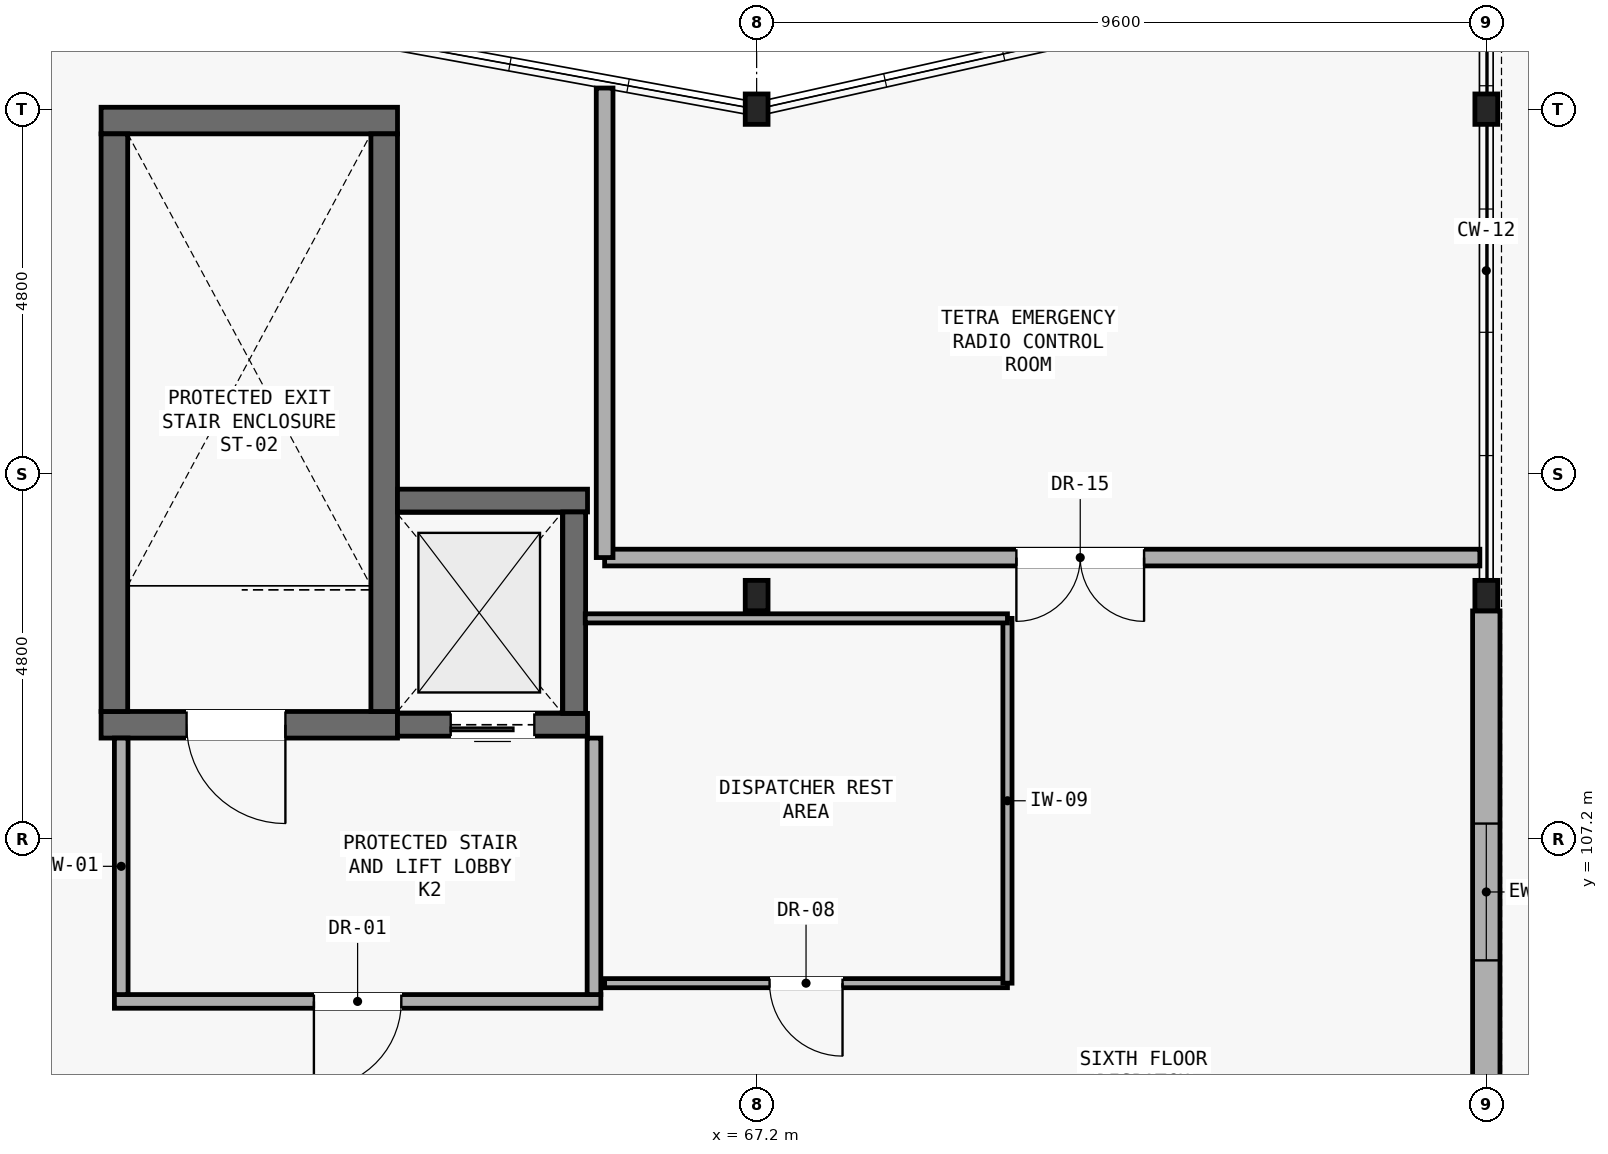
"""IFC4 building model, lengths in metres.
Left out: names, types, materials, properties, quantities, classifications, styles, units other than length and angle.
Written with IfcOpenShell. Run it as: python <this file> out.ifc"""

import sys

from ifc_helpers import new_model, si_unit, direction, frame, frame_2d, origin, origin_2d, place, context, subcontext, project, spatial, rectangle, i_section, extrude, element, fill, save


model = new_model("IFC4")
c1 = context("Model", 3, precision=1e-05, world=origin(), true_north=direction((0.0, 1.0)))
c2 = subcontext(c1, "Body", "Model", "MODEL_VIEW")
j1 = project(units=[si_unit("LENGTHUNIT", "METRE"), si_unit("PLANEANGLEUNIT", "RADIAN")], contexts=[c1])
p1 = place(None, origin())
s1 = spatial("IfcSite", under=j1, at=p1, CompositionType="ELEMENT")
p2 = place(p1, origin())
s2 = spatial("IfcBuilding", under=s1, at=p2, CompositionType="ELEMENT")
p3 = place(p2, frame((0.0, 0.0, 26.25)))
s3 = spatial("IfcBuildingStorey", under=s2, at=p3, CompositionType="ELEMENT", Elevation=26.25)
for number, where, z_axis, x_axis in (
    (1, (67.2, 110.4, 0.0), (0.0, 0.0, 1.0), (1.0, 0.0, 0.0)),
    (2, (67.2, 116.8, 0.0), (0.0, 0.0, 1.0), (1.0, 0.0, 0.0)),
    (3, (76.8, 110.4, 0.0), (0.0, 0.0, 1.0), (1.0, 0.0, 0.0)),
    (4, (76.8, 116.8, 0.0), (0.0, 0.0, 1.0), (1.0, 0.0, 0.0)),
):
    element("IfcColumn", number, at=place(p3, frame(where, z_axis=z_axis, x_axis=x_axis)), inside=s3, PredefinedType="COLUMN", context=c2, shape_type="SweptSolid", body=[
        extrude(i_section(OverallWidth=0.3, OverallDepth=0.4, WebThickness=0.013, FlangeThickness=0.024, FilletRadius=0.027, at=origin_2d()), origin(), (0.0, 0.0, 1.0), 4.9),
    ])
p4 = place(p3, frame((76.8, 102.802, 0.0), z_axis=(0.0, 0.0, 1.0), x_axis=(0.0, 1.0, 0.0)))
e5 = element("IfcWall", 5, at=p4, inside=s3, PredefinedType="SOLIDWALL", context=c2, shape_type="SweptSolid", body=[
    extrude(rectangle(XDim=7.396, YDim=0.36, at=frame_2d((3.698, 0.0))), origin(), (0.0, 0.0, 1.0), 4.205),
])
p5 = place(p4, frame((2.798, 0.0, 0.9)))
e6 = element("IfcOpeningElement", 6, at=p5, cuts=e5, PredefinedType="OPENING", context=c2, shape_type="SweptSolid", body=[
    extrude(rectangle(XDim=1.8, YDim=1.55, at=frame_2d((0.9, 0.775))), frame((0.0, 0.19, 0.0), z_axis=(0.0, -1.0, 0.0), x_axis=(1.0, 0.0, 0.0)), (0.0, 0.0, 1.0), 0.38),
])
p6 = place(p3, frame((86.25, 116.65, 0.0), z_axis=(0.0, 0.0, 1.0), x_axis=(-0.975439049829, 0.220269516883, 0.0)))
e7 = element("IfcWall", 7, at=p6, inside=s3, PredefinedType="PARAPET", context=c2, shape_type="SweptSolid", body=[
    extrude(rectangle(XDim=9.534, YDim=0.24, at=frame_2d((4.767, 0.0))), origin(), (0.0, 0.0, 1.0), 1.1),
])
p7 = place(p3, frame((58.575, 108.7, 0.0), z_axis=(0.0, 0.0, 1.0), x_axis=(1.0, 0.0, 0.0)))
e8 = element("IfcWall", 8, at=p7, inside=s3, PredefinedType="SHEAR", context=c2, shape_type="SweptSolid", body=[
    extrude(rectangle(XDim=3.9, YDim=0.35, at=frame_2d((1.95, 0.0))), origin(), (0.0, 0.0, 1.0), 4.71),
])
p8 = place(p7, frame((1.125, 0.0, 0.0)))
e9 = element("IfcOpeningElement", 9, at=p8, cuts=e8, PredefinedType="OPENING", context=c2, shape_type="SweptSolid", body=[
    extrude(rectangle(XDim=1.3, YDim=2.15, at=frame_2d((0.65, 1.075))), frame((0.0, 0.185, 0.0), z_axis=(0.0, -1.0, 0.0), x_axis=(1.0, 0.0, 0.0)), (0.0, 0.0, 1.0), 0.37),
])
p9 = place(p3, frame((58.575, 116.65, 0.0), z_axis=(0.0, 0.0, 1.0), x_axis=(1.0, 0.0, 0.0)))
e10 = element("IfcWall", 10, at=p9, inside=s3, PredefinedType="SHEAR", context=c2, shape_type="SweptSolid", body=[
    extrude(rectangle(XDim=3.9, YDim=0.35, at=frame_2d((1.95, 0.0))), origin(), (0.0, 0.0, 1.0), 4.71),
])
for number, where, z_axis, x_axis in (
    (11, (58.75, 108.875, 0.0), (0.0, 0.0, 1.0), (0.0, 1.0, 0.0)),
    (12, (62.3, 108.875, 0.0), (0.0, 0.0, 1.0), (0.0, 1.0, 0.0)),
):
    element("IfcWall", number, at=place(p3, frame(where, z_axis=z_axis, x_axis=x_axis)), inside=s3, PredefinedType="SHEAR", context=c2, shape_type="SweptSolid", body=[
        extrude(rectangle(XDim=7.6, YDim=0.35, at=frame_2d((3.8, 0.0))), origin(), (0.0, 0.0, 1.0), 4.71),
    ])
p10 = place(p3, frame((62.475, 108.7, 0.0), z_axis=(0.0, 0.0, 1.0), x_axis=(1.0, 0.0, 0.0)))
e13 = element("IfcWall", 13, at=p10, inside=s3, PredefinedType="SHEAR", context=c2, shape_type="SweptSolid", body=[
    extrude(rectangle(XDim=2.5, YDim=0.3, at=frame_2d((1.25, 0.0))), origin(), (0.0, 0.0, 1.0), 4.71),
])
p11 = place(p10, frame((0.7, 0.0, 0.0)))
e14 = element("IfcOpeningElement", 14, at=p11, cuts=e13, PredefinedType="OPENING", context=c2, shape_type="SweptSolid", body=[
    extrude(rectangle(XDim=1.1, YDim=2.1, at=frame_2d((0.55, 1.05))), frame((0.0, 0.16, 0.0), z_axis=(0.0, -1.0, 0.0), x_axis=(1.0, 0.0, 0.0)), (0.0, 0.0, 1.0), 0.32),
])
p12 = place(p3, frame((62.475, 111.65, 0.0), z_axis=(0.0, 0.0, 1.0), x_axis=(1.0, 0.0, 0.0)))
e15 = element("IfcWall", 15, at=p12, inside=s3, PredefinedType="SHEAR", context=c2, shape_type="SweptSolid", body=[
    extrude(rectangle(XDim=2.5, YDim=0.3, at=frame_2d((1.25, 0.0))), origin(), (0.0, 0.0, 1.0), 4.71),
])
p13 = place(p3, frame((64.8, 108.85, 0.0), z_axis=(0.0, 0.0, 1.0), x_axis=(0.0, 1.0, 0.0)))
e16 = element("IfcWall", 16, at=p13, inside=s3, PredefinedType="SHEAR", context=c2, shape_type="SweptSolid", body=[
    extrude(rectangle(XDim=2.65, YDim=0.3, at=frame_2d((1.325, 0.0))), origin(), (0.0, 0.0, 1.0), 4.71),
])
p14 = place(p3, frame((58.75, 105.06, 0.0), z_axis=(0.0, 0.0, 1.0), x_axis=(1.0, 0.0, 0.0)))
e17 = element("IfcWall", 17, at=p14, inside=s3, PredefinedType="PARTITIONING", context=c2, shape_type="SweptSolid", body=[
    extrude(rectangle(XDim=6.4, YDim=0.18, at=frame_2d((3.2, 0.0))), origin(), (0.0, 0.0, 1.0), 4.285),
])
p15 = place(p14, frame((2.625, 0.0, 0.0)))
e18 = element("IfcOpeningElement", 18, at=p15, cuts=e17, PredefinedType="OPENING", context=c2, shape_type="SweptSolid", body=[
    extrude(rectangle(XDim=1.15, YDim=2.15, at=frame_2d((0.575, 1.075))), frame((0.0, 0.1, 0.0), z_axis=(0.0, -1.0, 0.0), x_axis=(1.0, 0.0, 0.0)), (0.0, 0.0, 1.0), 0.2),
])
for number, where, z_axis, x_axis in (
    (19, (58.84, 105.15, 0.0), (0.0, 0.0, 1.0), (0.0, 1.0, 0.0)),
    (20, (65.06, 105.15, 0.0), (0.0, 0.0, 1.0), (0.0, 1.0, 0.0)),
):
    element("IfcWall", number, at=place(p3, frame(where, z_axis=z_axis, x_axis=x_axis)), inside=s3, PredefinedType="PARTITIONING", context=c2, shape_type="SweptSolid", body=[
        extrude(rectangle(XDim=3.375, YDim=0.18, at=frame_2d((1.688, 0.0))), origin(), (0.0, 0.0, 1.0), 4.71),
    ])
p16 = place(p3, frame((65.2, 110.9, 0.0), z_axis=(0.0, 0.0, 1.0), x_axis=(1.0, 0.0, 0.0)))
e21 = element("IfcWall", 21, at=p16, inside=s3, PredefinedType="PARTITIONING", context=c2, shape_type="SweptSolid", body=[
    extrude(rectangle(XDim=11.515, YDim=0.22, at=frame_2d((5.758, 0.0))), origin(), (0.0, 0.0, 1.0), 4.71),
])
p17 = place(p16, frame((5.417, 0.0, 0.0)))
e22 = element("IfcOpeningElement", 22, at=p17, cuts=e21, PredefinedType="OPENING", context=c2, shape_type="SweptSolid", body=[
    extrude(rectangle(XDim=1.68, YDim=2.2, at=frame_2d((0.84, 1.1))), frame((0.0, 0.12, 0.0), z_axis=(0.0, -1.0, 0.0), x_axis=(1.0, 0.0, 0.0)), (0.0, 0.0, 1.0), 0.24),
])
p18 = place(p3, frame((65.2, 117.078, 0.0), z_axis=(0.0, 0.0, 1.0), x_axis=(0.0, -1.0, 0.0)))
e23 = element("IfcWall", 23, at=p18, inside=s3, PredefinedType="PARTITIONING", context=c2, shape_type="SweptSolid", body=[
    extrude(rectangle(XDim=6.178, YDim=0.22, at=frame_2d((3.089, 0.0))), origin(), (0.0, 0.0, 1.0), 4.71),
])
p19 = place(p3, frame((65.2, 105.3, 0.0), z_axis=(0.0, 0.0, 1.0), x_axis=(1.0, 0.0, 0.0)))
e24 = element("IfcWall", 24, at=p19, inside=s3, PredefinedType="PARTITIONING", context=c2, shape_type="SweptSolid", body=[
    extrude(rectangle(XDim=5.3, YDim=0.12, at=frame_2d((2.65, 0.0))), origin(), (0.0, 0.0, 1.0), 4.285),
])
p20 = place(p19, frame((2.17, 0.0, 0.0)))
e25 = element("IfcOpeningElement", 25, at=p20, cuts=e24, PredefinedType="OPENING", context=c2, shape_type="SweptSolid", body=[
    extrude(rectangle(XDim=0.96, YDim=2.08, at=frame_2d((0.48, 1.04))), frame((0.0, 0.07, 0.0), z_axis=(0.0, -1.0, 0.0), x_axis=(1.0, 0.0, 0.0)), (0.0, 0.0, 1.0), 0.14),
])
p21 = place(p3, frame((70.5, 105.3, 0.0), z_axis=(0.0, 0.0, 1.0), x_axis=(0.0, 1.0, 0.0)))
e26 = element("IfcWall", 26, at=p21, inside=s3, PredefinedType="PARTITIONING", context=c2, shape_type="SweptSolid", body=[
    extrude(rectangle(XDim=4.8, YDim=0.12, at=frame_2d((2.4, 0.0))), origin(), (0.0, 0.0, 1.0), 4.71),
])
p22 = place(p3, frame((70.5, 110.1, 0.0), z_axis=(0.0, 0.0, 1.0), x_axis=(-1.0, 0.0, 0.0)))
e27 = element("IfcWall", 27, at=p22, inside=s3, PredefinedType="PARTITIONING", context=c2, shape_type="SweptSolid", body=[
    extrude(rectangle(XDim=5.555, YDim=0.12, at=frame_2d((2.777, 0.0))), origin(), (0.0, 0.0, 1.0), 4.71),
])
p23 = place(p5, origin())
e28 = element("IfcWindow", 28, at=p23, inside=s3, PartitioningType="SINGLE_PANEL", PredefinedType="WINDOW", context=c2, shape_type="SweptSolid", body=[
    extrude(rectangle(XDim=1.8, YDim=1.55, at=frame_2d((0.9, 0.775))), frame((0.0, 0.03, 0.0), z_axis=(0.0, -1.0, 0.0), x_axis=(1.0, 0.0, 0.0)), (0.0, 0.0, 1.0), 0.06),
])
fill(e6, e28)
p24 = place(p8, frame((1.3, 0.0, 0.0), z_axis=(0.0, 0.0, 1.0), x_axis=(-1.0, 0.0, 0.0)))
e29 = element("IfcDoor", 29, at=p24, inside=s3, OperationType="SINGLE_SWING_RIGHT", PredefinedType="DOOR", context=c2, shape_type="SweptSolid", body=[
    extrude(rectangle(XDim=1.3, YDim=2.15, at=frame_2d((0.65, 1.075))), frame((0.0, 0.025, 0.0), z_axis=(0.0, -1.0, 0.0), x_axis=(1.0, 0.0, 0.0)), (0.0, 0.0, 1.0), 0.05),
])
fill(e9, e29)
p25 = place(p11, frame((1.1, 0.0, 0.0), z_axis=(0.0, 0.0, 1.0), x_axis=(-1.0, 0.0, 0.0)))
e30 = element("IfcDoor", 30, at=p25, inside=s3, OperationType="SLIDING_TO_LEFT", PredefinedType="DOOR", context=c2, shape_type="SweptSolid", body=[
    extrude(rectangle(XDim=1.1, YDim=2.1, at=frame_2d((0.55, 1.05))), frame((0.0, 0.025, 0.0), z_axis=(0.0, -1.0, 0.0), x_axis=(1.0, 0.0, 0.0)), (0.0, 0.0, 1.0), 0.05),
])
fill(e14, e30)
p26 = place(p15, frame((1.15, 0.0, 0.0), z_axis=(0.0, 0.0, 1.0), x_axis=(-1.0, 0.0, 0.0)))
e31 = element("IfcDoor", 31, at=p26, inside=s3, OperationType="SINGLE_SWING_LEFT", PredefinedType="DOOR", context=c2, shape_type="SweptSolid", body=[
    extrude(rectangle(XDim=1.15, YDim=2.15, at=frame_2d((0.575, 1.075))), frame((0.0, 0.025, 0.0), z_axis=(0.0, -1.0, 0.0), x_axis=(1.0, 0.0, 0.0)), (0.0, 0.0, 1.0), 0.05),
])
fill(e18, e31)
p27 = place(p17, frame((1.68, 0.0, 0.0), z_axis=(0.0, 0.0, 1.0), x_axis=(-1.0, 0.0, 0.0)))
e32 = element("IfcDoor", 32, at=p27, inside=s3, OperationType="DOUBLE_DOOR_SINGLE_SWING", PredefinedType="DOOR", context=c2, shape_type="SweptSolid", body=[
    extrude(rectangle(XDim=1.68, YDim=2.2, at=frame_2d((0.84, 1.1))), frame((0.0, 0.025, 0.0), z_axis=(0.0, -1.0, 0.0), x_axis=(1.0, 0.0, 0.0)), (0.0, 0.0, 1.0), 0.05),
])
fill(e22, e32)
p28 = place(p20, frame((0.96, 0.0, 0.0), z_axis=(0.0, 0.0, 1.0), x_axis=(-1.0, 0.0, 0.0)))
e33 = element("IfcDoor", 33, at=p28, inside=s3, OperationType="SINGLE_SWING_RIGHT", PredefinedType="DOOR", context=c2, shape_type="SweptSolid", body=[
    extrude(rectangle(XDim=0.96, YDim=2.08, at=frame_2d((0.48, 1.04))), frame((0.0, 0.025, 0.0), z_axis=(0.0, -1.0, 0.0), x_axis=(1.0, 0.0, 0.0)), (0.0, 0.0, 1.0), 0.05),
])
fill(e25, e33)
save(model, sys.argv[1])
